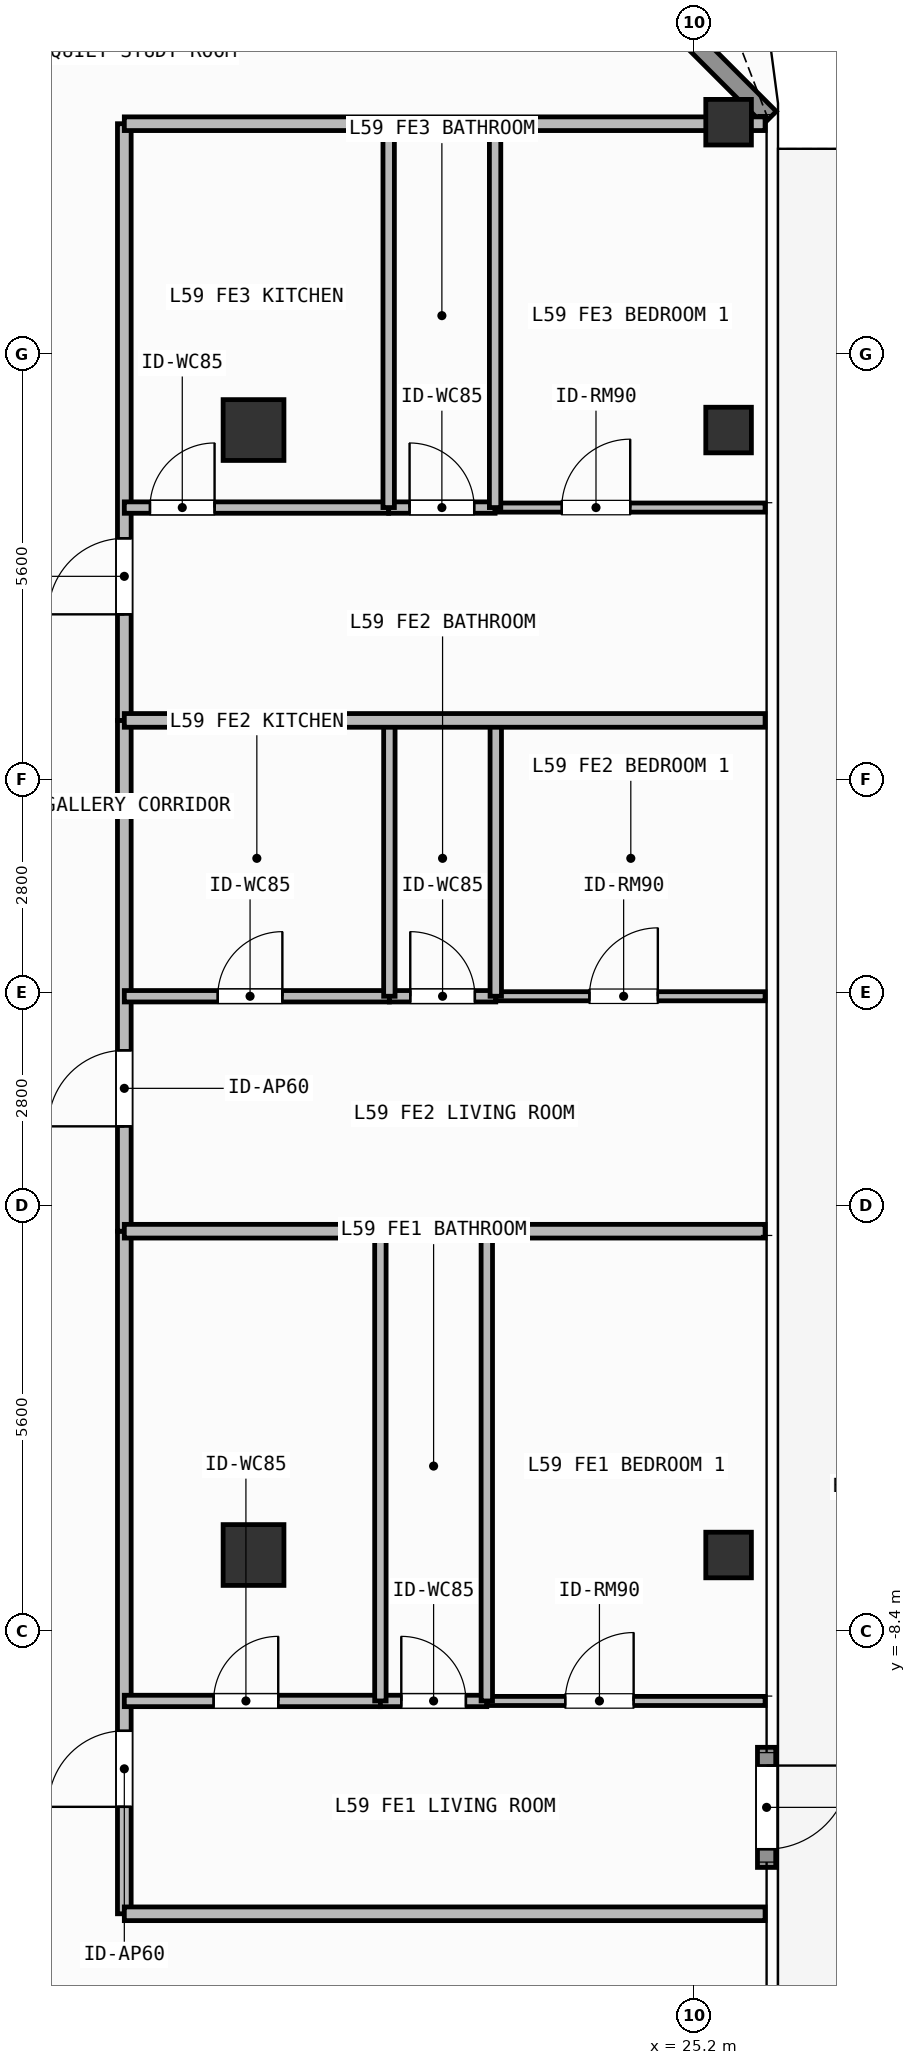
"""IFC4 building model, lengths in metres.
Left out: names, types, materials, properties, quantities, classifications, styles, units other than length and angle.
Written with IfcOpenShell. Run it as: python <this file> out.ifc"""

import sys

from ifc_helpers import new_model, si_unit, direction, frame, frame_2d, origin, origin_2d, place, context, subcontext, project, spatial, rectangle, hollow_rectangle, extrude, element, fill, save


model = new_model("IFC4")
c1 = context("Model", 3, precision=1e-05, world=origin(), true_north=direction((0.0, 1.0)))
c2 = subcontext(c1, "Body", "Model", "MODEL_VIEW")
j1 = project(units=[si_unit("LENGTHUNIT", "METRE"), si_unit("PLANEANGLEUNIT", "RADIAN")], contexts=[c1])
p1 = place(None, origin())
s1 = spatial("IfcSite", under=j1, at=p1, CompositionType="ELEMENT")
p2 = place(p1, origin())
s2 = spatial("IfcBuilding", under=s1, at=p2, CompositionType="ELEMENT")
p3 = place(p2, frame((0.0, 0.0, 243.0)))
s3 = spatial("IfcBuildingStorey", under=s2, at=p3, CompositionType="ELEMENT", Elevation=243.0)
for number, where, z_axis, x_axis in (
    (1, (19.4, -7.4, 0.0), (0.0, 0.0, 1.0), (1.0, 0.0, 0.0)),
    (2, (19.4, 7.4, 0.0), (0.0, 0.0, 1.0), (1.0, 0.0, 0.0)),
):
    element("IfcColumn", number, at=place(p3, frame(where, z_axis=z_axis, x_axis=x_axis)), inside=s3, PredefinedType="COLUMN", context=c2, shape_type="SweptSolid", body=[
        extrude(hollow_rectangle(XDim=0.8, YDim=0.8, WallThickness=0.036, at=origin_2d()), origin(), (0.0, 0.0, 1.0), 3.9),
    ])
for number, where, z_axis, x_axis in (
    (3, (25.65, 11.45, 0.0), (0.0, 0.0, 1.0), (1.0, 0.0, 0.0)),
    (4, (25.65, -7.4, 0.0), (0.0, 0.0, 1.0), (1.0, 0.0, 0.0)),
    (5, (25.65, 7.4, 0.0), (0.0, 0.0, 1.0), (1.0, 0.0, 0.0)),
):
    element("IfcColumn", number, at=place(p3, frame(where, z_axis=z_axis, x_axis=x_axis)), inside=s3, PredefinedType="COLUMN", context=c2, shape_type="SweptSolid", body=[
        extrude(hollow_rectangle(XDim=0.6, YDim=0.6, WallThickness=0.028, at=origin_2d()), origin(), (0.0, 0.0, 1.0), 3.9),
    ])
p4 = place(p3, frame((26.15, -9.93, 0.0), z_axis=(0.0, 0.0, 1.0), x_axis=(0.0, -1.0, 0.0)))
e6 = element("IfcWall", 6, at=p4, inside=s3, PredefinedType="SOLIDWALL", context=c2, shape_type="SweptSolid", body=[
    extrude(rectangle(XDim=1.58, YDim=0.24, at=frame_2d((0.79, 0.0))), origin(), (0.0, 0.0, 1.0), 3.68),
])
p5 = place(p4, frame((0.24, 0.0, 0.0)))
e7 = element("IfcOpeningElement", 7, at=p5, cuts=e6, PredefinedType="OPENING", context=c2, shape_type="SweptSolid", body=[
    extrude(rectangle(XDim=1.1, YDim=2.2, at=frame_2d((0.55, 1.1))), frame((0.0, 0.13, 0.0), z_axis=(0.0, -1.0, 0.0), x_axis=(1.0, 0.0, 0.0)), (0.0, 0.0, 1.0), 0.26),
])
p6 = place(p3, frame((21.808, 15.892, 0.0), z_axis=(0.0, 0.0, 1.0), x_axis=(0.707106781187, -0.707106781187, 0.0)))
e8 = element("IfcWall", 8, at=p6, inside=s3, PredefinedType="SOLIDWALL", context=c2, shape_type="SweptSolid", body=[
    extrude(rectangle(XDim=6.201, YDim=0.24, at=frame_2d((3.101, 0.0))), origin(), (0.0, 0.0, 1.0), 3.68),
])
p7 = place(p3, frame((17.7, -12.12, 0.0), z_axis=(0.0, 0.0, 1.0), x_axis=(0.0, 1.0, 0.0)))
e9 = element("IfcWall", 9, at=p7, inside=s3, PredefinedType="PARTITIONING", context=c2, shape_type="SweptSolid", body=[
    extrude(rectangle(XDim=8.98, YDim=0.18, at=frame_2d((4.49, 0.0))), origin(), (0.0, 0.0, 1.0), 3.68),
])
p8 = place(p7, frame((1.407, 0.0, 0.0)))
e10 = element("IfcOpeningElement", 10, at=p8, cuts=e9, PredefinedType="OPENING", context=c2, shape_type="SweptSolid", body=[
    extrude(rectangle(XDim=1.0, YDim=2.2, at=frame_2d((0.5, 1.1))), frame((0.0, 0.1, 0.0), z_axis=(0.0, -1.0, 0.0), x_axis=(1.0, 0.0, 0.0)), (0.0, 0.0, 1.0), 0.2),
])
p9 = place(p3, frame((17.7, -9.32, 0.0), z_axis=(0.0, 0.0, 1.0), x_axis=(1.0, 0.0, 0.0)))
e11 = element("IfcWall", 11, at=p9, inside=s3, PredefinedType="PARTITIONING", context=c2, shape_type="SweptSolid", body=[
    extrude(rectangle(XDim=3.369, YDim=0.15, at=frame_2d((1.685, 0.0))), origin(), (0.0, 0.0, 1.0), 3.68),
])
p10 = place(p9, frame((1.175, 0.0, 0.0)))
e12 = element("IfcOpeningElement", 12, at=p10, cuts=e11, PredefinedType="OPENING", context=c2, shape_type="SweptSolid", body=[
    extrude(rectangle(XDim=0.85, YDim=2.1, at=frame_2d((0.425, 1.05))), frame((0.0, 0.085, 0.0), z_axis=(0.0, -1.0, 0.0), x_axis=(1.0, 0.0, 0.0)), (0.0, 0.0, 1.0), 0.17),
])
p11 = place(p3, frame((21.069, -9.32, 0.0), z_axis=(0.0, 0.0, 1.0), x_axis=(1.0, 0.0, 0.0)))
e13 = element("IfcWall", 13, at=p11, inside=s3, PredefinedType="PARTITIONING", context=c2, shape_type="SweptSolid", body=[
    extrude(rectangle(XDim=1.4, YDim=0.15, at=frame_2d((0.7, 0.0))), origin(), (0.0, 0.0, 1.0), 3.68),
])
p12 = place(p11, frame((0.275, 0.0, 0.0)))
e14 = element("IfcOpeningElement", 14, at=p12, cuts=e13, PredefinedType="OPENING", context=c2, shape_type="SweptSolid", body=[
    extrude(rectangle(XDim=0.85, YDim=2.1, at=frame_2d((0.425, 1.05))), frame((0.0, 0.085, 0.0), z_axis=(0.0, -1.0, 0.0), x_axis=(1.0, 0.0, 0.0)), (0.0, 0.0, 1.0), 0.17),
])
p13 = place(p3, frame((22.469, -9.32, 0.0), z_axis=(0.0, 0.0, 1.0), x_axis=(1.0, 0.0, 0.0)))
e15 = element("IfcWall", 15, at=p13, inside=s3, PredefinedType="PARTITIONING", context=c2, shape_type="SweptSolid", body=[
    extrude(rectangle(XDim=3.661, YDim=0.12, at=frame_2d((1.831, 0.0))), origin(), (0.0, 0.0, 1.0), 3.68),
])
p14 = place(p13, frame((1.032, 0.0, 0.0)))
e16 = element("IfcOpeningElement", 16, at=p14, cuts=e15, PredefinedType="OPENING", context=c2, shape_type="SweptSolid", body=[
    extrude(rectangle(XDim=0.9, YDim=2.1, at=frame_2d((0.45, 1.05))), frame((0.0, 0.07, 0.0), z_axis=(0.0, -1.0, 0.0), x_axis=(1.0, 0.0, 0.0)), (0.0, 0.0, 1.0), 0.14),
])
p15 = place(p3, frame((17.7, -3.14, 0.0), z_axis=(0.0, 0.0, 1.0), x_axis=(0.0, 1.0, 0.0)))
e17 = element("IfcWall", 17, at=p15, inside=s3, PredefinedType="PARTITIONING", context=c2, shape_type="SweptSolid", body=[
    extrude(rectangle(XDim=6.72, YDim=0.18, at=frame_2d((3.36, 0.0))), origin(), (0.0, 0.0, 1.0), 3.68),
])
p16 = place(p15, frame((1.379, 0.0, 0.0)))
e18 = element("IfcOpeningElement", 18, at=p16, cuts=e17, PredefinedType="OPENING", context=c2, shape_type="SweptSolid", body=[
    extrude(rectangle(XDim=1.0, YDim=2.2, at=frame_2d((0.5, 1.1))), frame((0.0, 0.1, 0.0), z_axis=(0.0, -1.0, 0.0), x_axis=(1.0, 0.0, 0.0)), (0.0, 0.0, 1.0), 0.2),
])
p17 = place(p3, frame((17.7, -0.049, 0.0), z_axis=(0.0, 0.0, 1.0), x_axis=(1.0, 0.0, 0.0)))
e19 = element("IfcWall", 19, at=p17, inside=s3, PredefinedType="PARTITIONING", context=c2, shape_type="SweptSolid", body=[
    extrude(rectangle(XDim=3.487, YDim=0.15, at=frame_2d((1.744, 0.0))), origin(), (0.0, 0.0, 1.0), 3.68),
])
p18 = place(p17, frame((1.229, 0.0, 0.0)))
e20 = element("IfcOpeningElement", 20, at=p18, cuts=e19, PredefinedType="OPENING", context=c2, shape_type="SweptSolid", body=[
    extrude(rectangle(XDim=0.85, YDim=2.1, at=frame_2d((0.425, 1.05))), frame((0.0, 0.085, 0.0), z_axis=(0.0, -1.0, 0.0), x_axis=(1.0, 0.0, 0.0)), (0.0, 0.0, 1.0), 0.17),
])
p19 = place(p3, frame((21.187, -0.049, 0.0), z_axis=(0.0, 0.0, 1.0), x_axis=(1.0, 0.0, 0.0)))
e21 = element("IfcWall", 21, at=p19, inside=s3, PredefinedType="PARTITIONING", context=c2, shape_type="SweptSolid", body=[
    extrude(rectangle(XDim=1.4, YDim=0.15, at=frame_2d((0.7, 0.0))), origin(), (0.0, 0.0, 1.0), 3.68),
])
p20 = place(p19, frame((0.275, 0.0, 0.0)))
e22 = element("IfcOpeningElement", 22, at=p20, cuts=e21, PredefinedType="OPENING", context=c2, shape_type="SweptSolid", body=[
    extrude(rectangle(XDim=0.85, YDim=2.1, at=frame_2d((0.425, 1.05))), frame((0.0, 0.085, 0.0), z_axis=(0.0, -1.0, 0.0), x_axis=(1.0, 0.0, 0.0)), (0.0, 0.0, 1.0), 0.17),
])
p21 = place(p3, frame((22.587, -0.049, 0.0), z_axis=(0.0, 0.0, 1.0), x_axis=(1.0, 0.0, 0.0)))
e23 = element("IfcWall", 23, at=p21, inside=s3, PredefinedType="PARTITIONING", context=c2, shape_type="SweptSolid", body=[
    extrude(rectangle(XDim=3.543, YDim=0.12, at=frame_2d((1.771, 0.0))), origin(), (0.0, 0.0, 1.0), 3.68),
])
p22 = place(p21, frame((1.232, 0.0, 0.0)))
e24 = element("IfcOpeningElement", 24, at=p22, cuts=e23, PredefinedType="OPENING", context=c2, shape_type="SweptSolid", body=[
    extrude(rectangle(XDim=0.9, YDim=2.1, at=frame_2d((0.45, 1.05))), frame((0.0, 0.07, 0.0), z_axis=(0.0, -1.0, 0.0), x_axis=(1.0, 0.0, 0.0)), (0.0, 0.0, 1.0), 0.14),
])
p23 = place(p3, frame((17.7, 3.58, 0.0), z_axis=(0.0, 0.0, 1.0), x_axis=(0.0, 1.0, 0.0)))
e25 = element("IfcWall", 25, at=p23, inside=s3, PredefinedType="PARTITIONING", context=c2, shape_type="SweptSolid", body=[
    extrude(rectangle(XDim=7.85, YDim=0.18, at=frame_2d((3.925, 0.0))), origin(), (0.0, 0.0, 1.0), 3.68),
])
p24 = place(p23, frame((1.396, 0.0, 0.0)))
e26 = element("IfcOpeningElement", 26, at=p24, cuts=e25, PredefinedType="OPENING", context=c2, shape_type="SweptSolid", body=[
    extrude(rectangle(XDim=1.0, YDim=2.2, at=frame_2d((0.5, 1.1))), frame((0.0, 0.1, 0.0), z_axis=(0.0, -1.0, 0.0), x_axis=(1.0, 0.0, 0.0)), (0.0, 0.0, 1.0), 0.2),
])
p25 = place(p3, frame((17.7, 6.38, 0.0), z_axis=(0.0, 0.0, 1.0), x_axis=(1.0, 0.0, 0.0)))
e27 = element("IfcWall", 27, at=p25, inside=s3, PredefinedType="PARTITIONING", context=c2, shape_type="SweptSolid", body=[
    extrude(rectangle(XDim=3.478, YDim=0.15, at=frame_2d((1.739, 0.0))), origin(), (0.0, 0.0, 1.0), 3.68),
])
p26 = place(p25, frame((0.337, 0.0, 0.0)))
e28 = element("IfcOpeningElement", 28, at=p26, cuts=e27, PredefinedType="OPENING", context=c2, shape_type="SweptSolid", body=[
    extrude(rectangle(XDim=0.85, YDim=2.1, at=frame_2d((0.425, 1.05))), frame((0.0, 0.085, 0.0), z_axis=(0.0, -1.0, 0.0), x_axis=(1.0, 0.0, 0.0)), (0.0, 0.0, 1.0), 0.17),
])
p27 = place(p3, frame((21.178, 6.38, 0.0), z_axis=(0.0, 0.0, 1.0), x_axis=(1.0, 0.0, 0.0)))
e29 = element("IfcWall", 29, at=p27, inside=s3, PredefinedType="PARTITIONING", context=c2, shape_type="SweptSolid", body=[
    extrude(rectangle(XDim=1.4, YDim=0.15, at=frame_2d((0.7, 0.0))), origin(), (0.0, 0.0, 1.0), 3.68),
])
p28 = place(p27, frame((0.275, 0.0, 0.0)))
e30 = element("IfcOpeningElement", 30, at=p28, cuts=e29, PredefinedType="OPENING", context=c2, shape_type="SweptSolid", body=[
    extrude(rectangle(XDim=0.85, YDim=2.1, at=frame_2d((0.425, 1.05))), frame((0.0, 0.085, 0.0), z_axis=(0.0, -1.0, 0.0), x_axis=(1.0, 0.0, 0.0)), (0.0, 0.0, 1.0), 0.17),
])
p29 = place(p3, frame((22.578, 6.38, 0.0), z_axis=(0.0, 0.0, 1.0), x_axis=(1.0, 0.0, 0.0)))
e31 = element("IfcWall", 31, at=p29, inside=s3, PredefinedType="PARTITIONING", context=c2, shape_type="SweptSolid", body=[
    extrude(rectangle(XDim=3.552, YDim=0.12, at=frame_2d((1.776, 0.0))), origin(), (0.0, 0.0, 1.0), 3.68),
])
p30 = place(p29, frame((0.877, 0.0, 0.0)))
e32 = element("IfcOpeningElement", 32, at=p30, cuts=e31, PredefinedType="OPENING", context=c2, shape_type="SweptSolid", body=[
    extrude(rectangle(XDim=0.9, YDim=2.1, at=frame_2d((0.45, 1.05))), frame((0.0, 0.07, 0.0), z_axis=(0.0, -1.0, 0.0), x_axis=(1.0, 0.0, 0.0)), (0.0, 0.0, 1.0), 0.14),
])
for number, where, z_axis, x_axis in (
    (33, (21.069, -9.32, 0.0), (0.0, 0.0, 1.0), (0.0, 1.0, 0.0)),
    (34, (22.469, -9.32, 0.0), (0.0, 0.0, 1.0), (0.0, 1.0, 0.0)),
):
    element("IfcWall", number, at=place(p3, frame(where, z_axis=z_axis, x_axis=x_axis)), inside=s3, PredefinedType="PARTITIONING", context=c2, shape_type="SweptSolid", body=[
        extrude(rectangle(XDim=6.18, YDim=0.15, at=frame_2d((3.09, 0.0))), origin(), (0.0, 0.0, 1.0), 3.68),
    ])
for number, where, z_axis, x_axis in (
    (35, (21.187, -0.049, 0.0), (0.0, 0.0, 1.0), (0.0, 1.0, 0.0)),
    (36, (22.587, -0.049, 0.0), (0.0, 0.0, 1.0), (0.0, 1.0, 0.0)),
):
    element("IfcWall", number, at=place(p3, frame(where, z_axis=z_axis, x_axis=x_axis)), inside=s3, PredefinedType="PARTITIONING", context=c2, shape_type="SweptSolid", body=[
        extrude(rectangle(XDim=3.629, YDim=0.15, at=frame_2d((1.814, 0.0))), origin(), (0.0, 0.0, 1.0), 3.68),
    ])
p31 = place(p3, frame((17.7, -3.14, 0.0), z_axis=(0.0, 0.0, 1.0), x_axis=(1.0, 0.0, 0.0)))
e37 = element("IfcWall", 37, at=p31, inside=s3, PredefinedType="PARTITIONING", context=c2, shape_type="SweptSolid", body=[
    extrude(rectangle(XDim=8.43, YDim=0.18, at=frame_2d((4.215, 0.0))), origin(), (0.0, 0.0, 1.0), 3.68),
])
for number, where, z_axis, x_axis in (
    (38, (21.178, 6.38, 0.0), (0.0, 0.0, 1.0), (0.0, 1.0, 0.0)),
    (39, (22.578, 6.38, 0.0), (0.0, 0.0, 1.0), (0.0, 1.0, 0.0)),
):
    element("IfcWall", number, at=place(p3, frame(where, z_axis=z_axis, x_axis=x_axis)), inside=s3, PredefinedType="PARTITIONING", context=c2, shape_type="SweptSolid", body=[
        extrude(rectangle(XDim=5.05, YDim=0.15, at=frame_2d((2.525, 0.0))), origin(), (0.0, 0.0, 1.0), 3.68),
    ])
for number, where, z_axis, x_axis in (
    (40, (17.7, 3.58, 0.0), (0.0, 0.0, 1.0), (1.0, 0.0, 0.0)),
    (41, (17.7, -12.12, 0.0), (0.0, 0.0, 1.0), (1.0, 0.0, 0.0)),
):
    element("IfcWall", number, at=place(p3, frame(where, z_axis=z_axis, x_axis=x_axis)), inside=s3, PredefinedType="PARTITIONING", context=c2, shape_type="SweptSolid", body=[
        extrude(rectangle(XDim=8.43, YDim=0.18, at=frame_2d((4.215, 0.0))), origin(), (0.0, 0.0, 1.0), 3.68),
    ])
p32 = place(p3, frame((17.7, 11.43, 0.0), z_axis=(0.0, 0.0, 1.0), x_axis=(1.0, 0.0, 0.0)))
e42 = element("IfcWall", 42, at=p32, inside=s3, PredefinedType="PARTITIONING", context=c2, shape_type="SweptSolid", body=[
    extrude(rectangle(XDim=8.43, YDim=0.18, at=frame_2d((4.215, 0.0))), origin(), (0.0, 0.0, 1.0), 3.42),
])
p33 = place(p5, origin())
e43 = element("IfcDoor", 43, at=p33, inside=s3, OperationType="SINGLE_SWING_LEFT", PredefinedType="DOOR", context=c2, shape_type="SweptSolid", body=[
    extrude(rectangle(XDim=1.1, YDim=2.2, at=frame_2d((0.55, 1.1))), frame((0.0, 0.025, 0.0), z_axis=(0.0, -1.0, 0.0), x_axis=(1.0, 0.0, 0.0)), (0.0, 0.0, 1.0), 0.05),
])
fill(e7, e43)
p34 = place(p8, origin())
e44 = element("IfcDoor", 44, at=p34, inside=s3, OperationType="SINGLE_SWING_LEFT", PredefinedType="DOOR", context=c2, shape_type="SweptSolid", body=[
    extrude(rectangle(XDim=1.0, YDim=2.2, at=frame_2d((0.5, 1.1))), frame((0.0, 0.025, 0.0), z_axis=(0.0, -1.0, 0.0), x_axis=(1.0, 0.0, 0.0)), (0.0, 0.0, 1.0), 0.05),
])
fill(e10, e44)
p35 = place(p10, origin())
e45 = element("IfcDoor", 45, at=p35, inside=s3, OperationType="SINGLE_SWING_RIGHT", PredefinedType="DOOR", context=c2, shape_type="SweptSolid", body=[
    extrude(rectangle(XDim=0.85, YDim=2.1, at=frame_2d((0.425, 1.05))), frame((0.0, 0.025, 0.0), z_axis=(0.0, -1.0, 0.0), x_axis=(1.0, 0.0, 0.0)), (0.0, 0.0, 1.0), 0.05),
])
fill(e12, e45)
p36 = place(p12, origin())
e46 = element("IfcDoor", 46, at=p36, inside=s3, OperationType="SINGLE_SWING_LEFT", PredefinedType="DOOR", context=c2, shape_type="SweptSolid", body=[
    extrude(rectangle(XDim=0.85, YDim=2.1, at=frame_2d((0.425, 1.05))), frame((0.0, 0.025, 0.0), z_axis=(0.0, -1.0, 0.0), x_axis=(1.0, 0.0, 0.0)), (0.0, 0.0, 1.0), 0.05),
])
fill(e14, e46)
p37 = place(p14, origin())
e47 = element("IfcDoor", 47, at=p37, inside=s3, OperationType="SINGLE_SWING_RIGHT", PredefinedType="DOOR", context=c2, shape_type="SweptSolid", body=[
    extrude(rectangle(XDim=0.9, YDim=2.1, at=frame_2d((0.45, 1.05))), frame((0.0, 0.025, 0.0), z_axis=(0.0, -1.0, 0.0), x_axis=(1.0, 0.0, 0.0)), (0.0, 0.0, 1.0), 0.05),
])
fill(e16, e47)
p38 = place(p16, origin())
e48 = element("IfcDoor", 48, at=p38, inside=s3, OperationType="SINGLE_SWING_LEFT", PredefinedType="DOOR", context=c2, shape_type="SweptSolid", body=[
    extrude(rectangle(XDim=1.0, YDim=2.2, at=frame_2d((0.5, 1.1))), frame((0.0, 0.025, 0.0), z_axis=(0.0, -1.0, 0.0), x_axis=(1.0, 0.0, 0.0)), (0.0, 0.0, 1.0), 0.05),
])
fill(e18, e48)
p39 = place(p18, origin())
e49 = element("IfcDoor", 49, at=p39, inside=s3, OperationType="SINGLE_SWING_RIGHT", PredefinedType="DOOR", context=c2, shape_type="SweptSolid", body=[
    extrude(rectangle(XDim=0.85, YDim=2.1, at=frame_2d((0.425, 1.05))), frame((0.0, 0.025, 0.0), z_axis=(0.0, -1.0, 0.0), x_axis=(1.0, 0.0, 0.0)), (0.0, 0.0, 1.0), 0.05),
])
fill(e20, e49)
p40 = place(p20, origin())
e50 = element("IfcDoor", 50, at=p40, inside=s3, OperationType="SINGLE_SWING_LEFT", PredefinedType="DOOR", context=c2, shape_type="SweptSolid", body=[
    extrude(rectangle(XDim=0.85, YDim=2.1, at=frame_2d((0.425, 1.05))), frame((0.0, 0.025, 0.0), z_axis=(0.0, -1.0, 0.0), x_axis=(1.0, 0.0, 0.0)), (0.0, 0.0, 1.0), 0.05),
])
fill(e22, e50)
p41 = place(p22, origin())
e51 = element("IfcDoor", 51, at=p41, inside=s3, OperationType="SINGLE_SWING_RIGHT", PredefinedType="DOOR", context=c2, shape_type="SweptSolid", body=[
    extrude(rectangle(XDim=0.9, YDim=2.1, at=frame_2d((0.45, 1.05))), frame((0.0, 0.025, 0.0), z_axis=(0.0, -1.0, 0.0), x_axis=(1.0, 0.0, 0.0)), (0.0, 0.0, 1.0), 0.05),
])
fill(e24, e51)
p42 = place(p24, origin())
e52 = element("IfcDoor", 52, at=p42, inside=s3, OperationType="SINGLE_SWING_LEFT", PredefinedType="DOOR", context=c2, shape_type="SweptSolid", body=[
    extrude(rectangle(XDim=1.0, YDim=2.2, at=frame_2d((0.5, 1.1))), frame((0.0, 0.025, 0.0), z_axis=(0.0, -1.0, 0.0), x_axis=(1.0, 0.0, 0.0)), (0.0, 0.0, 1.0), 0.05),
])
fill(e26, e52)
p43 = place(p26, origin())
e53 = element("IfcDoor", 53, at=p43, inside=s3, OperationType="SINGLE_SWING_RIGHT", PredefinedType="DOOR", context=c2, shape_type="SweptSolid", body=[
    extrude(rectangle(XDim=0.85, YDim=2.1, at=frame_2d((0.425, 1.05))), frame((0.0, 0.025, 0.0), z_axis=(0.0, -1.0, 0.0), x_axis=(1.0, 0.0, 0.0)), (0.0, 0.0, 1.0), 0.05),
])
fill(e28, e53)
p44 = place(p28, origin())
e54 = element("IfcDoor", 54, at=p44, inside=s3, OperationType="SINGLE_SWING_LEFT", PredefinedType="DOOR", context=c2, shape_type="SweptSolid", body=[
    extrude(rectangle(XDim=0.85, YDim=2.1, at=frame_2d((0.425, 1.05))), frame((0.0, 0.025, 0.0), z_axis=(0.0, -1.0, 0.0), x_axis=(1.0, 0.0, 0.0)), (0.0, 0.0, 1.0), 0.05),
])
fill(e30, e54)
p45 = place(p30, origin())
e55 = element("IfcDoor", 55, at=p45, inside=s3, OperationType="SINGLE_SWING_RIGHT", PredefinedType="DOOR", context=c2, shape_type="SweptSolid", body=[
    extrude(rectangle(XDim=0.9, YDim=2.1, at=frame_2d((0.45, 1.05))), frame((0.0, 0.025, 0.0), z_axis=(0.0, -1.0, 0.0), x_axis=(1.0, 0.0, 0.0)), (0.0, 0.0, 1.0), 0.05),
])
fill(e32, e55)
save(model, sys.argv[1])
